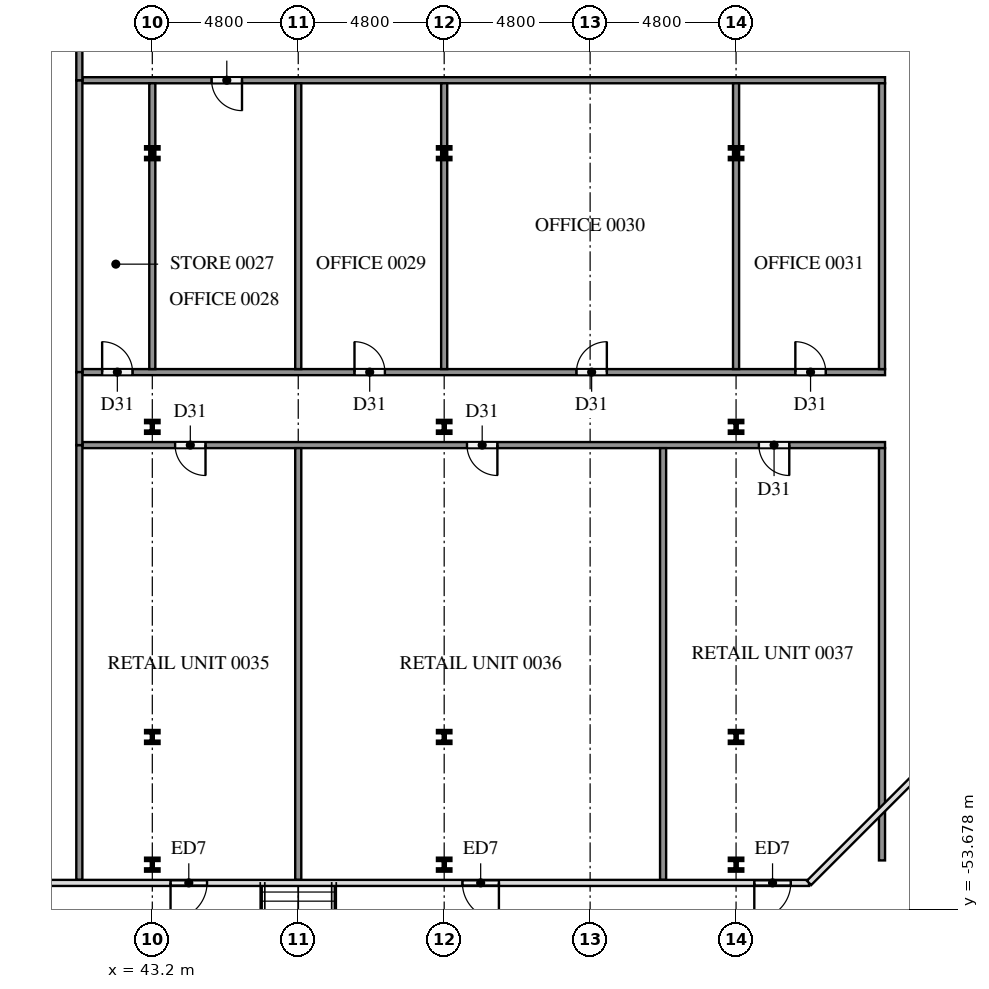
"""IFC4 building model, lengths in metres.
Left out: names, types, materials, properties, quantities, classifications, styles, units other than length and angle.
Written with IfcOpenShell. Run it as: python <this file> out.ifc"""

import sys

from ifc_helpers import new_model, si_unit, direction, frame, frame_2d, origin, origin_2d, place, context, subcontext, project, spatial, rectangle, i_section, extrude, element, fill, save


model = new_model("IFC4")
c1 = context("Model", 3, precision=1e-05, world=origin(), true_north=direction((0.0, 1.0)))
c2 = subcontext(c1, "Body", "Model", "MODEL_VIEW")
j1 = project(units=[si_unit("LENGTHUNIT", "METRE"), si_unit("PLANEANGLEUNIT", "RADIAN")], contexts=[c1])
p1 = place(None, origin())
s1 = spatial("IfcSite", under=j1, at=p1, CompositionType="ELEMENT")
p2 = place(p1, origin())
s2 = spatial("IfcBuilding", under=s1, at=p2, CompositionType="ELEMENT")
p3 = place(p2, origin())
s3 = spatial("IfcBuildingStorey", under=s2, at=p3, CompositionType="ELEMENT", Elevation=0.0)
for number, where, z_axis, x_axis in (
    (1, (43.2, -52.2, 0.0), (0.0, 0.0, 1.0), (1.0, 0.0, 0.0)),
    (2, (43.2, -48.0, 0.0), (0.0, 0.0, 1.0), (1.0, 0.0, 0.0)),
    (3, (43.2, -37.8, 0.0), (0.0, 0.0, 1.0), (1.0, 0.0, 0.0)),
    (4, (43.2, -28.8, 0.0), (0.0, 0.0, 1.0), (1.0, 0.0, 0.0)),
    (5, (52.8, -52.2, 0.0), (0.0, 0.0, 1.0), (1.0, 0.0, 0.0)),
    (6, (52.8, -48.0, 0.0), (0.0, 0.0, 1.0), (1.0, 0.0, 0.0)),
    (7, (52.8, -37.8, 0.0), (0.0, 0.0, 1.0), (1.0, 0.0, 0.0)),
    (8, (52.8, -28.8, 0.0), (0.0, 0.0, 1.0), (1.0, 0.0, 0.0)),
    (9, (62.4, -52.2, 0.0), (0.0, 0.0, 1.0), (1.0, 0.0, 0.0)),
    (10, (62.4, -48.0, 0.0), (0.0, 0.0, 1.0), (1.0, 0.0, 0.0)),
    (11, (62.4, -37.8, 0.0), (0.0, 0.0, 1.0), (1.0, 0.0, 0.0)),
    (12, (62.4, -28.8, 0.0), (0.0, 0.0, 1.0), (1.0, 0.0, 0.0)),
):
    element("IfcColumn", number, at=place(p3, frame(where, z_axis=z_axis, x_axis=x_axis)), inside=s3, PredefinedType="COLUMN", context=c2, shape_type="SweptSolid", body=[
        extrude(i_section(OverallWidth=0.396, OverallDepth=0.381, WebThickness=0.019, FlangeThickness=0.03, at=origin_2d()), origin(), (0.0, 0.0, 1.0), 5.7),
    ])
p4 = place(p3, frame((36.0, -52.8, 0.0), z_axis=(0.0, 0.0, 1.0), x_axis=(1.0, 0.0, 0.0)))
e13 = element("IfcWall", 13, at=p4, inside=s3, PredefinedType="SOLIDWALL", context=c2, shape_type="SweptSolid", body=[
    extrude(rectangle(XDim=4.8, YDim=0.15, at=frame_2d((2.4, 0.0))), origin(), (0.0, 0.0, 1.0), 5.7),
])
p5 = place(p4, frame((1.2, 0.0, 0.0)))
e14 = element("IfcOpeningElement", 14, at=p5, cuts=e13, PredefinedType="OPENING", context=c2, shape_type="SweptSolid", body=[
    extrude(rectangle(XDim=2.4, YDim=2.7, at=frame_2d((1.2, 1.35))), frame((0.0, 0.085, 0.0), z_axis=(0.0, -1.0, 0.0), x_axis=(1.0, 0.0, 0.0)), (0.0, 0.0, 1.0), 0.17),
])
p6 = place(p3, frame((45.6, -52.8, 0.0), z_axis=(0.0, 0.0, 1.0), x_axis=(-1.0, 0.0, 0.0)))
e15 = element("IfcWall", 15, at=p6, inside=s3, PredefinedType="SOLIDWALL", context=c2, shape_type="SweptSolid", body=[
    extrude(rectangle(XDim=2.4, YDim=0.15, at=frame_2d((1.2, 0.0))), origin(), (0.0, 0.0, 1.0), 5.7),
])
p7 = place(p6, frame((0.6, 0.0, 0.0)))
e16 = element("IfcOpeningElement", 16, at=p7, cuts=e15, PredefinedType="OPENING", context=c2, shape_type="SweptSolid", body=[
    extrude(rectangle(XDim=1.2, YDim=2.4, at=frame_2d((0.6, 1.2))), frame((0.0, 0.085, 0.0), z_axis=(0.0, -1.0, 0.0), x_axis=(1.0, 0.0, 0.0)), (0.0, 0.0, 1.0), 0.17),
])
p8 = place(p3, frame((55.2, -52.8, 0.0), z_axis=(0.0, 0.0, 1.0), x_axis=(-1.0, 0.0, 0.0)))
e17 = element("IfcWall", 17, at=p8, inside=s3, PredefinedType="SOLIDWALL", context=c2, shape_type="SweptSolid", body=[
    extrude(rectangle(XDim=2.4, YDim=0.15, at=frame_2d((1.2, 0.0))), origin(), (0.0, 0.0, 1.0), 5.7),
])
p9 = place(p8, frame((0.6, 0.0, 0.0)))
e18 = element("IfcOpeningElement", 18, at=p9, cuts=e17, PredefinedType="OPENING", context=c2, shape_type="SweptSolid", body=[
    extrude(rectangle(XDim=1.2, YDim=2.4, at=frame_2d((0.6, 1.2))), frame((0.0, 0.085, 0.0), z_axis=(0.0, -1.0, 0.0), x_axis=(1.0, 0.0, 0.0)), (0.0, 0.0, 1.0), 0.17),
])
p10 = place(p3, frame((64.8, -52.8, 0.0), z_axis=(0.0, 0.0, 1.0), x_axis=(-1.0, 0.0, 0.0)))
e19 = element("IfcWall", 19, at=p10, inside=s3, PredefinedType="SOLIDWALL", context=c2, shape_type="SweptSolid", body=[
    extrude(rectangle(XDim=2.4, YDim=0.15, at=frame_2d((1.2, 0.0))), origin(), (0.0, 0.0, 1.0), 5.7),
])
p11 = place(p10, frame((0.6, 0.0, 0.0)))
e20 = element("IfcOpeningElement", 20, at=p11, cuts=e19, PredefinedType="OPENING", context=c2, shape_type="SweptSolid", body=[
    extrude(rectangle(XDim=1.2, YDim=2.4, at=frame_2d((0.6, 1.2))), frame((0.0, 0.085, 0.0), z_axis=(0.0, -1.0, 0.0), x_axis=(1.0, 0.0, 0.0)), (0.0, 0.0, 1.0), 0.17),
])
p12 = place(p3, frame((67.3, -38.4, 0.0), z_axis=(0.0, 0.0, 1.0), x_axis=(-1.0, 0.0, 0.0)))
e21 = element("IfcWall", 21, at=p12, inside=s3, PredefinedType="PARTITIONING", context=c2, shape_type="SweptSolid", body=[
    extrude(rectangle(XDim=26.4, YDim=0.2, at=frame_2d((13.2, 0.0))), origin(), (0.0, 0.0, 1.0), 5.7),
])
p13 = place(p12, frame((22.35, 0.0, 0.0)))
e22 = element("IfcOpeningElement", 22, at=p13, cuts=e21, PredefinedType="OPENING", context=c2, shape_type="SweptSolid", body=[
    extrude(rectangle(XDim=1.0, YDim=2.1, at=frame_2d((0.5, 1.05))), frame((0.0, 0.11, 0.0), z_axis=(0.0, -1.0, 0.0), x_axis=(1.0, 0.0, 0.0)), (0.0, 0.0, 1.0), 0.22),
])
p14 = place(p12, frame((12.75, 0.0, 0.0)))
e23 = element("IfcOpeningElement", 23, at=p14, cuts=e21, PredefinedType="OPENING", context=c2, shape_type="SweptSolid", body=[
    extrude(rectangle(XDim=1.0, YDim=2.1, at=frame_2d((0.5, 1.05))), frame((0.0, 0.11, 0.0), z_axis=(0.0, -1.0, 0.0), x_axis=(1.0, 0.0, 0.0)), (0.0, 0.0, 1.0), 0.22),
])
p15 = place(p12, frame((3.15, 0.0, 0.0)))
e24 = element("IfcOpeningElement", 24, at=p15, cuts=e21, PredefinedType="OPENING", context=c2, shape_type="SweptSolid", body=[
    extrude(rectangle(XDim=1.0, YDim=2.1, at=frame_2d((0.5, 1.05))), frame((0.0, 0.11, 0.0), z_axis=(0.0, -1.0, 0.0), x_axis=(1.0, 0.0, 0.0)), (0.0, 0.0, 1.0), 0.22),
])
p16 = place(p3, frame((40.9, -36.0, 0.0), z_axis=(0.0, 0.0, 1.0), x_axis=(1.0, 0.0, 0.0)))
e25 = element("IfcWall", 25, at=p16, inside=s3, PredefinedType="PARTITIONING", context=c2, shape_type="SweptSolid", body=[
    extrude(rectangle(XDim=26.4, YDim=0.2, at=frame_2d((13.2, 0.0))), origin(), (0.0, 0.0, 1.0), 5.7),
])
p17 = place(p16, frame((0.65, 0.0, 0.0)))
e26 = element("IfcOpeningElement", 26, at=p17, cuts=e25, PredefinedType="OPENING", context=c2, shape_type="SweptSolid", body=[
    extrude(rectangle(XDim=1.0, YDim=2.1, at=frame_2d((0.5, 1.05))), frame((0.0, 0.11, 0.0), z_axis=(0.0, -1.0, 0.0), x_axis=(1.0, 0.0, 0.0)), (0.0, 0.0, 1.0), 0.22),
])
p18 = place(p16, frame((8.95, 0.0, 0.0)))
e27 = element("IfcOpeningElement", 27, at=p18, cuts=e25, PredefinedType="OPENING", context=c2, shape_type="SweptSolid", body=[
    extrude(rectangle(XDim=1.0, YDim=2.1, at=frame_2d((0.5, 1.05))), frame((0.0, 0.11, 0.0), z_axis=(0.0, -1.0, 0.0), x_axis=(1.0, 0.0, 0.0)), (0.0, 0.0, 1.0), 0.22),
])
p19 = place(p16, frame((16.25, 0.0, 0.0)))
e28 = element("IfcOpeningElement", 28, at=p19, cuts=e25, PredefinedType="OPENING", context=c2, shape_type="SweptSolid", body=[
    extrude(rectangle(XDim=1.0, YDim=2.1, at=frame_2d((0.5, 1.05))), frame((0.0, 0.11, 0.0), z_axis=(0.0, -1.0, 0.0), x_axis=(1.0, 0.0, 0.0)), (0.0, 0.0, 1.0), 0.22),
])
p20 = place(p16, frame((23.45, 0.0, 0.0)))
e29 = element("IfcOpeningElement", 29, at=p20, cuts=e25, PredefinedType="OPENING", context=c2, shape_type="SweptSolid", body=[
    extrude(rectangle(XDim=1.0, YDim=2.1, at=frame_2d((0.5, 1.05))), frame((0.0, 0.11, 0.0), z_axis=(0.0, -1.0, 0.0), x_axis=(1.0, 0.0, 0.0)), (0.0, 0.0, 1.0), 0.22),
])
p21 = place(p3, frame((67.3, -26.4, 0.0), z_axis=(0.0, 0.0, 1.0), x_axis=(-1.0, 0.0, 0.0)))
e30 = element("IfcWall", 30, at=p21, inside=s3, PredefinedType="PARTITIONING", context=c2, shape_type="SweptSolid", body=[
    extrude(rectangle(XDim=26.4, YDim=0.2, at=frame_2d((13.2, 0.0))), origin(), (0.0, 0.0, 1.0), 5.7),
])
p22 = place(p21, frame((21.15, 0.0, 0.0)))
e31 = element("IfcOpeningElement", 31, at=p22, cuts=e30, PredefinedType="OPENING", context=c2, shape_type="SweptSolid", body=[
    extrude(rectangle(XDim=1.0, YDim=2.1, at=frame_2d((0.5, 1.05))), frame((0.0, 0.11, 0.0), z_axis=(0.0, -1.0, 0.0), x_axis=(1.0, 0.0, 0.0)), (0.0, 0.0, 1.0), 0.22),
])
p23 = place(p3, frame((40.8, -52.7, 0.0), z_axis=(0.0, 0.0, 1.0), x_axis=(0.0, 1.0, 0.0)))
e32 = element("IfcWall", 32, at=p23, inside=s3, PredefinedType="PARTITIONING", context=c2, shape_type="SweptSolid", body=[
    extrude(rectangle(XDim=14.3, YDim=0.2, at=frame_2d((7.15, 0.0))), origin(), (0.0, 0.0, 1.0), 5.7),
])
p24 = place(p3, frame((40.8, -36.0, 0.0), z_axis=(0.0, 0.0, 1.0), x_axis=(0.0, 1.0, 0.0)))
e33 = element("IfcWall", 33, at=p24, inside=s3, PredefinedType="PARTITIONING", context=c2, shape_type="SweptSolid", body=[
    extrude(rectangle(XDim=9.6, YDim=0.2, at=frame_2d((4.8, 0.0))), origin(), (0.0, 0.0, 1.0), 5.7),
])
p25 = place(p3, frame((40.8, -38.4, 0.0), z_axis=(0.0, 0.0, 1.0), x_axis=(0.0, 1.0, 0.0)))
e34 = element("IfcWall", 34, at=p25, inside=s3, PredefinedType="PARTITIONING", context=c2, shape_type="SweptSolid", body=[
    extrude(rectangle(XDim=2.4, YDim=0.2, at=frame_2d((1.2, 0.0))), origin(), (0.0, 0.0, 1.0), 5.7),
])
p26 = place(p3, frame((40.8, -26.4, 0.0), z_axis=(0.0, 0.0, 1.0), x_axis=(0.0, 1.0, 0.0)))
e35 = element("IfcWall", 35, at=p26, inside=s3, PredefinedType="PARTITIONING", context=c2, shape_type="SweptSolid", body=[
    extrude(rectangle(XDim=3.0, YDim=0.2, at=frame_2d((1.5, 0.0))), origin(), (0.0, 0.0, 1.0), 5.7),
])
p27 = place(p3, frame((43.2, -35.9, 0.0), z_axis=(0.0, 0.0, 1.0), x_axis=(0.0, 1.0, 0.0)))
e36 = element("IfcWall", 36, at=p27, inside=s3, PredefinedType="PARTITIONING", context=c2, shape_type="SweptSolid", body=[
    extrude(rectangle(XDim=9.4, YDim=0.2, at=frame_2d((4.7, 0.0))), origin(), (0.0, 0.0, 1.0), 5.7),
])
p28 = place(p3, frame((48.0, -52.7, 0.0), z_axis=(0.0, 0.0, 1.0), x_axis=(0.0, 1.0, 0.0)))
e37 = element("IfcWall", 37, at=p28, inside=s3, PredefinedType="PARTITIONING", context=c2, shape_type="SweptSolid", body=[
    extrude(rectangle(XDim=14.2, YDim=0.2, at=frame_2d((7.1, 0.0))), origin(), (0.0, 0.0, 1.0), 5.7),
])
for number, where, z_axis, x_axis in (
    (38, (48.0, -35.9, 0.0), (0.0, 0.0, 1.0), (0.0, 1.0, 0.0)),
    (39, (52.8, -35.9, 0.0), (0.0, 0.0, 1.0), (0.0, 1.0, 0.0)),
):
    element("IfcWall", number, at=place(p3, frame(where, z_axis=z_axis, x_axis=x_axis)), inside=s3, PredefinedType="PARTITIONING", context=c2, shape_type="SweptSolid", body=[
        extrude(rectangle(XDim=9.4, YDim=0.2, at=frame_2d((4.7, 0.0))), origin(), (0.0, 0.0, 1.0), 5.7),
    ])
p29 = place(p3, frame((60.0, -52.7, 0.0), z_axis=(0.0, 0.0, 1.0), x_axis=(0.0, 1.0, 0.0)))
e40 = element("IfcWall", 40, at=p29, inside=s3, PredefinedType="PARTITIONING", context=c2, shape_type="SweptSolid", body=[
    extrude(rectangle(XDim=14.2, YDim=0.2, at=frame_2d((7.1, 0.0))), origin(), (0.0, 0.0, 1.0), 5.7),
])
p30 = place(p3, frame((62.4, -35.9, 0.0), z_axis=(0.0, 0.0, 1.0), x_axis=(0.0, 1.0, 0.0)))
e41 = element("IfcWall", 41, at=p30, inside=s3, PredefinedType="PARTITIONING", context=c2, shape_type="SweptSolid", body=[
    extrude(rectangle(XDim=9.4, YDim=0.2, at=frame_2d((4.7, 0.0))), origin(), (0.0, 0.0, 1.0), 5.7),
])
p31 = place(p3, frame((67.2, -52.06, 0.0), z_axis=(0.0, 0.0, 1.0), x_axis=(0.0, 1.0, 0.0)))
e42 = element("IfcWall", 42, at=p31, inside=s3, PredefinedType="PARTITIONING", context=c2, shape_type="SweptSolid", body=[
    extrude(rectangle(XDim=13.56, YDim=0.2, at=frame_2d((6.78, 0.0))), origin(), (0.0, 0.0, 1.0), 5.7),
])
p32 = place(p3, frame((67.2, -35.9, 0.0), z_axis=(0.0, 0.0, 1.0), x_axis=(0.0, 1.0, 0.0)))
e43 = element("IfcWall", 43, at=p32, inside=s3, PredefinedType="PARTITIONING", context=c2, shape_type="SweptSolid", body=[
    extrude(rectangle(XDim=9.4, YDim=0.2, at=frame_2d((4.7, 0.0))), origin(), (0.0, 0.0, 1.0), 5.7),
])
p33 = place(p7, origin())
e44 = element("IfcDoor", 44, at=p33, inside=s3, OperationType="SINGLE_SWING_RIGHT", PredefinedType="DOOR", context=c2, shape_type="SweptSolid", body=[
    extrude(rectangle(XDim=1.2, YDim=2.4, at=frame_2d((0.6, 1.2))), frame((0.0, 0.025, 0.0), z_axis=(0.0, -1.0, 0.0), x_axis=(1.0, 0.0, 0.0)), (0.0, 0.0, 1.0), 0.05),
])
fill(e16, e44)
p34 = place(p9, origin())
e45 = element("IfcDoor", 45, at=p34, inside=s3, OperationType="SINGLE_SWING_LEFT", PredefinedType="DOOR", context=c2, shape_type="SweptSolid", body=[
    extrude(rectangle(XDim=1.2, YDim=2.4, at=frame_2d((0.6, 1.2))), frame((0.0, 0.025, 0.0), z_axis=(0.0, -1.0, 0.0), x_axis=(1.0, 0.0, 0.0)), (0.0, 0.0, 1.0), 0.05),
])
fill(e18, e45)
p35 = place(p11, origin())
e46 = element("IfcDoor", 46, at=p35, inside=s3, OperationType="SINGLE_SWING_RIGHT", PredefinedType="DOOR", context=c2, shape_type="SweptSolid", body=[
    extrude(rectangle(XDim=1.2, YDim=2.4, at=frame_2d((0.6, 1.2))), frame((0.0, 0.025, 0.0), z_axis=(0.0, -1.0, 0.0), x_axis=(1.0, 0.0, 0.0)), (0.0, 0.0, 1.0), 0.05),
])
fill(e20, e46)
p36 = place(p17, origin())
e47 = element("IfcDoor", 47, at=p36, inside=s3, OperationType="SINGLE_SWING_LEFT", PredefinedType="DOOR", context=c2, shape_type="SweptSolid", body=[
    extrude(rectangle(XDim=1.0, YDim=2.1, at=frame_2d((0.5, 1.05))), frame((0.0, 0.025, 0.0), z_axis=(0.0, -1.0, 0.0), x_axis=(1.0, 0.0, 0.0)), (0.0, 0.0, 1.0), 0.05),
])
fill(e26, e47)
p37 = place(p22, origin())
e48 = element("IfcDoor", 48, at=p37, inside=s3, OperationType="SINGLE_SWING_LEFT", PredefinedType="DOOR", context=c2, shape_type="SweptSolid", body=[
    extrude(rectangle(XDim=1.0, YDim=2.1, at=frame_2d((0.5, 1.05))), frame((0.0, 0.025, 0.0), z_axis=(0.0, -1.0, 0.0), x_axis=(1.0, 0.0, 0.0)), (0.0, 0.0, 1.0), 0.05),
])
fill(e31, e48)
p38 = place(p18, origin())
e49 = element("IfcDoor", 49, at=p38, inside=s3, OperationType="SINGLE_SWING_LEFT", PredefinedType="DOOR", context=c2, shape_type="SweptSolid", body=[
    extrude(rectangle(XDim=1.0, YDim=2.1, at=frame_2d((0.5, 1.05))), frame((0.0, 0.025, 0.0), z_axis=(0.0, -1.0, 0.0), x_axis=(1.0, 0.0, 0.0)), (0.0, 0.0, 1.0), 0.05),
])
fill(e27, e49)
p39 = place(p19, origin())
e50 = element("IfcDoor", 50, at=p39, inside=s3, OperationType="SINGLE_SWING_RIGHT", PredefinedType="DOOR", context=c2, shape_type="SweptSolid", body=[
    extrude(rectangle(XDim=1.0, YDim=2.1, at=frame_2d((0.5, 1.05))), frame((0.0, 0.025, 0.0), z_axis=(0.0, -1.0, 0.0), x_axis=(1.0, 0.0, 0.0)), (0.0, 0.0, 1.0), 0.05),
])
fill(e28, e50)
p40 = place(p20, origin())
e51 = element("IfcDoor", 51, at=p40, inside=s3, OperationType="SINGLE_SWING_LEFT", PredefinedType="DOOR", context=c2, shape_type="SweptSolid", body=[
    extrude(rectangle(XDim=1.0, YDim=2.1, at=frame_2d((0.5, 1.05))), frame((0.0, 0.025, 0.0), z_axis=(0.0, -1.0, 0.0), x_axis=(1.0, 0.0, 0.0)), (0.0, 0.0, 1.0), 0.05),
])
fill(e29, e51)
p41 = place(p13, origin())
e52 = element("IfcDoor", 52, at=p41, inside=s3, OperationType="SINGLE_SWING_LEFT", PredefinedType="DOOR", context=c2, shape_type="SweptSolid", body=[
    extrude(rectangle(XDim=1.0, YDim=2.1, at=frame_2d((0.5, 1.05))), frame((0.0, 0.025, 0.0), z_axis=(0.0, -1.0, 0.0), x_axis=(1.0, 0.0, 0.0)), (0.0, 0.0, 1.0), 0.05),
])
fill(e22, e52)
p42 = place(p14, origin())
e53 = element("IfcDoor", 53, at=p42, inside=s3, OperationType="SINGLE_SWING_LEFT", PredefinedType="DOOR", context=c2, shape_type="SweptSolid", body=[
    extrude(rectangle(XDim=1.0, YDim=2.1, at=frame_2d((0.5, 1.05))), frame((0.0, 0.025, 0.0), z_axis=(0.0, -1.0, 0.0), x_axis=(1.0, 0.0, 0.0)), (0.0, 0.0, 1.0), 0.05),
])
fill(e23, e53)
p43 = place(p15, origin())
e54 = element("IfcDoor", 54, at=p43, inside=s3, OperationType="SINGLE_SWING_LEFT", PredefinedType="DOOR", context=c2, shape_type="SweptSolid", body=[
    extrude(rectangle(XDim=1.0, YDim=2.1, at=frame_2d((0.5, 1.05))), frame((0.0, 0.025, 0.0), z_axis=(0.0, -1.0, 0.0), x_axis=(1.0, 0.0, 0.0)), (0.0, 0.0, 1.0), 0.05),
])
fill(e24, e54)
save(model, sys.argv[1])
